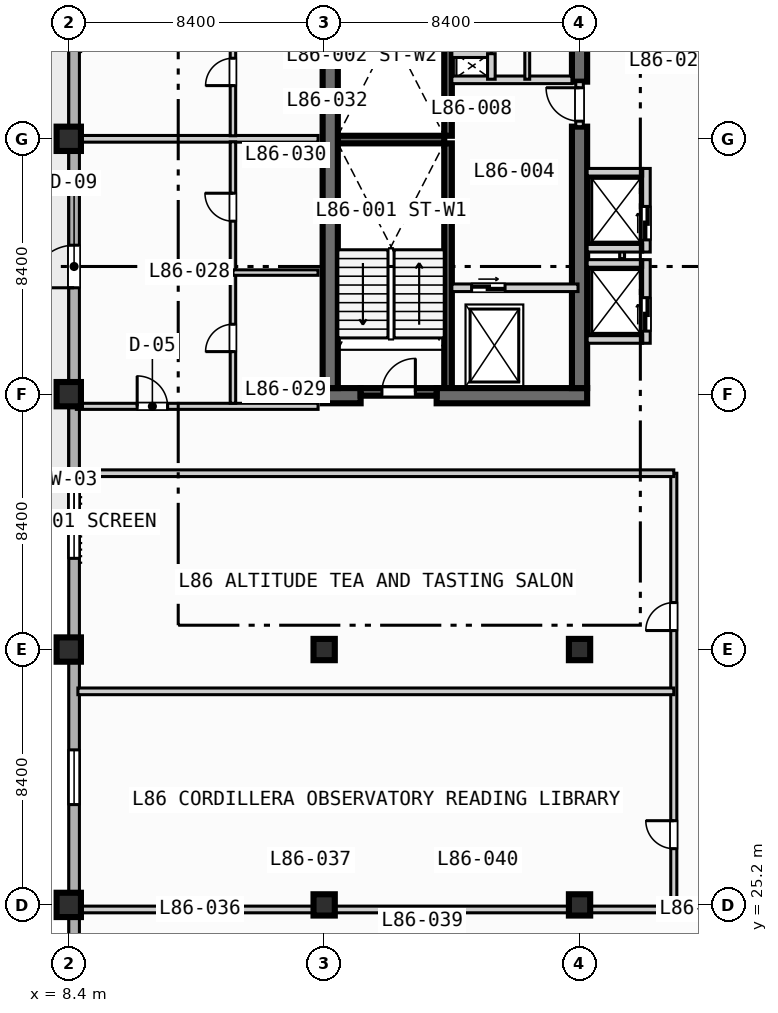
"""IFC4 building model, lengths in metres.
Left out: names, types, materials, properties, quantities, classifications, styles, units other than length and angle.
Written with IfcOpenShell. Run it as: python <this file> out.ifc"""

import sys

from ifc_helpers import new_model, si_unit, direction, frame, frame_2d, origin, origin_2d, place, context, subcontext, project, spatial, rectangle, extrude, element, fill, save


model = new_model("IFC4")
c1 = context("Model", 3, precision=1e-05, world=origin(), true_north=direction((0.0, 1.0)))
c2 = subcontext(c1, "Body", "Model", "MODEL_VIEW")
j1 = project(units=[si_unit("LENGTHUNIT", "METRE"), si_unit("PLANEANGLEUNIT", "RADIAN")], contexts=[c1])
p1 = place(None, origin())
s1 = spatial("IfcSite", under=j1, at=p1, CompositionType="ELEMENT")
p2 = place(p1, origin())
s2 = spatial("IfcBuilding", under=s1, at=p2, CompositionType="ELEMENT")
p3 = place(p2, frame((0.0, 0.0, 347.6)))
s3 = spatial("IfcBuildingStorey", under=s2, at=p3, CompositionType="ELEMENT", Elevation=347.6)
for number, where, z_axis, x_axis in (
    (1, (20.875, 42.2, 0.0), (0.0, 0.0, 1.0), (0.0, 1.0, 0.0)),
    (2, (20.875, 50.5, 0.0), (0.0, 0.0, 1.0), (0.0, 1.0, 0.0)),
):
    element("IfcWall", number, at=place(p3, frame(where, z_axis=z_axis, x_axis=x_axis)), inside=s3, PredefinedType="SOLIDWALL", context=c2, shape_type="SweptSolid", body=[
        extrude(rectangle(XDim=8.05, YDim=0.25, at=frame_2d((4.025, 0.0))), origin(), (0.0, 0.0, 1.0), 3.67),
    ])
p4 = place(p3, frame((17.25, 50.375, 0.0), z_axis=(0.0, 0.0, 1.0), x_axis=(1.0, 0.0, 0.0)))
e3 = element("IfcWall", 3, at=p4, inside=s3, PredefinedType="SOLIDWALL", context=c2, shape_type="SweptSolid", body=[
    extrude(rectangle(XDim=3.5, YDim=0.25, at=frame_2d((1.75, 0.0))), origin(), (0.0, 0.0, 1.0), 3.67),
])
p5 = place(p3, frame((16.75, 41.95, 0.0), z_axis=(0.0, 0.0, 1.0), x_axis=(1.0, 0.0, 0.0)))
e4 = element("IfcWall", 4, at=p5, inside=s3, PredefinedType="SHEAR", context=c2, shape_type="SweptSolid", body=[
    extrude(rectangle(XDim=1.25, YDim=0.5, at=frame_2d((0.625, 0.0))), origin(), (0.0, 0.0, 1.0), 3.67),
])
p6 = place(p3, frame((20.5, 41.95, 0.0), z_axis=(0.0, 0.0, 1.0), x_axis=(1.0, 0.0, 0.0)))
e5 = element("IfcWall", 5, at=p6, inside=s3, PredefinedType="SHEAR", context=c2, shape_type="SweptSolid", body=[
    extrude(rectangle(XDim=4.95, YDim=0.5, at=frame_2d((2.475, 0.0))), origin(), (0.0, 0.0, 1.0), 3.67),
])
p7 = place(p3, frame((17.0, 42.2, 0.0), z_axis=(0.0, 0.0, 1.0), x_axis=(0.0, 1.0, 0.0)))
e6 = element("IfcWall", 6, at=p7, inside=s3, PredefinedType="SHEAR", context=c2, shape_type="SweptSolid", body=[
    extrude(rectangle(XDim=16.35, YDim=0.5, at=frame_2d((8.175, 0.0))), origin(), (0.0, 0.0, 1.0), 3.67),
])
p8 = place(p3, frame((25.2, 42.2, 0.0), z_axis=(0.0, 0.0, 1.0), x_axis=(0.0, 1.0, 0.0)))
e7 = element("IfcWall", 7, at=p8, inside=s3, PredefinedType="SHEAR", context=c2, shape_type="SweptSolid", body=[
    extrude(rectangle(XDim=8.6, YDim=0.5, at=frame_2d((4.3, 0.0))), origin(), (0.0, 0.0, 1.0), 3.67),
])
p9 = place(p3, frame((25.2, 52.28, 0.0), z_axis=(0.0, 0.0, 1.0), x_axis=(0.0, 1.0, 0.0)))
e8 = element("IfcWall", 8, at=p9, inside=s3, PredefinedType="SHEAR", context=c2, shape_type="SweptSolid", body=[
    extrude(rectangle(XDim=1.27, YDim=0.5, at=frame_2d((0.635, 0.0))), origin(), (0.0, 0.0, 1.0), 3.67),
])
for number, where, z_axis, x_axis in (
    (9, (8.4, 25.2, 0.0), (0.0, 0.0, 1.0), (1.0, 0.0, 0.0)),
    (10, (8.4, 33.6, 0.0), (0.0, 0.0, 1.0), (1.0, 0.0, 0.0)),
    (11, (8.4, 42.0, 0.0), (0.0, 0.0, 1.0), (1.0, 0.0, 0.0)),
    (12, (8.4, 50.4, 0.0), (0.0, 0.0, 1.0), (1.0, 0.0, 0.0)),
):
    element("IfcColumn", number, at=place(p3, frame(where, z_axis=z_axis, x_axis=x_axis)), inside=s3, PredefinedType="COLUMN", context=c2, shape_type="SweptSolid", body=[
        extrude(rectangle(XDim=0.8, YDim=0.8, at=origin_2d()), origin(), (0.0, 0.0, 1.0), 3.9),
    ])
for number, where, z_axis, x_axis in (
    (13, (16.8, 25.2, 0.0), (0.0, 0.0, 1.0), (1.0, 0.0, 0.0)),
    (14, (16.8, 33.6, 0.0), (0.0, 0.0, 1.0), (1.0, 0.0, 0.0)),
    (15, (25.2, 25.2, 0.0), (0.0, 0.0, 1.0), (1.0, 0.0, 0.0)),
    (16, (25.2, 33.6, 0.0), (0.0, 0.0, 1.0), (1.0, 0.0, 0.0)),
):
    element("IfcColumn", number, at=place(p3, frame(where, z_axis=z_axis, x_axis=x_axis)), inside=s3, PredefinedType="COLUMN", context=c2, shape_type="SweptSolid", body=[
        extrude(rectangle(XDim=0.7, YDim=0.7, at=origin_2d()), origin(), (0.0, 0.0, 1.0), 3.9),
    ])
p10 = place(p3, frame((8.575, 11.575, 0.0), z_axis=(0.0, 0.0, 1.0), x_axis=(0.0, 1.0, 0.0)))
e17 = element("IfcWall", 17, at=p10, inside=s3, PredefinedType="STANDARD", context=c2, shape_type="SweptSolid", body=[
    extrude(rectangle(XDim=60.85, YDim=0.35, at=frame_2d((30.425, 0.0))), origin(), (0.0, 0.0, 1.0), 3.67),
])
p11 = place(p10, frame((33.925, 0.0, 0.0)))
e18 = element("IfcOpeningElement", 18, at=p11, cuts=e17, PredefinedType="OPENING", context=c2, shape_type="SweptSolid", body=[
    extrude(rectangle(XDim=1.4, YDim=2.2, at=frame_2d((0.7, 1.1))), frame((0.0, 0.185, 0.0), z_axis=(0.0, -1.0, 0.0), x_axis=(1.0, 0.0, 0.0)), (0.0, 0.0, 1.0), 0.37),
])
p12 = place(p10, frame((16.925, 0.0, 0.85)))
e19 = element("IfcOpeningElement", 19, at=p12, cuts=e17, PredefinedType="OPENING", context=c2, shape_type="SweptSolid", body=[
    extrude(rectangle(XDim=1.8, YDim=1.8, at=frame_2d((0.9, 0.9))), frame((0.0, 0.185, 0.0), z_axis=(0.0, -1.0, 0.0), x_axis=(1.0, 0.0, 0.0)), (0.0, 0.0, 1.0), 0.37),
])
p13 = place(p10, frame((25.025, 0.0, 0.85)))
e20 = element("IfcOpeningElement", 20, at=p13, cuts=e17, PredefinedType="OPENING", context=c2, shape_type="SweptSolid", body=[
    extrude(rectangle(XDim=2.4, YDim=1.95, at=frame_2d((1.2, 0.975))), frame((0.0, 0.185, 0.0), z_axis=(0.0, -1.0, 0.0), x_axis=(1.0, 0.0, 0.0)), (0.0, 0.0, 1.0), 0.37),
])
p14 = place(p10, frame((41.825, 0.0, 0.85)))
e21 = element("IfcOpeningElement", 21, at=p14, cuts=e17, PredefinedType="OPENING", context=c2, shape_type="SweptSolid", body=[
    extrude(rectangle(XDim=2.4, YDim=1.95, at=frame_2d((1.2, 0.975))), frame((0.0, 0.185, 0.0), z_axis=(0.0, -1.0, 0.0), x_axis=(1.0, 0.0, 0.0)), (0.0, 0.0, 1.0), 0.37),
])
p15 = place(p3, frame((18.0, 42.075, 0.0), z_axis=(0.0, 0.0, 1.0), x_axis=(1.0, 0.0, 0.0)))
e22 = element("IfcWall", 22, at=p15, inside=s3, PredefinedType="SOLIDWALL", context=c2, shape_type="SweptSolid", body=[
    extrude(rectangle(XDim=2.5, YDim=0.25, at=frame_2d((1.25, 0.0))), origin(), (0.0, 0.0, 1.0), 3.67),
])
p16 = place(p15, frame((0.7, 0.0, 0.0)))
e23 = element("IfcOpeningElement", 23, at=p16, cuts=e22, PredefinedType="OPENING", context=c2, shape_type="SweptSolid", body=[
    extrude(rectangle(XDim=1.1, YDim=2.15, at=frame_2d((0.55, 1.075))), frame((0.0, 0.135, 0.0), z_axis=(0.0, -1.0, 0.0), x_axis=(1.0, 0.0, 0.0)), (0.0, 0.0, 1.0), 0.27),
])
p17 = place(p3, frame((21.0, 45.5, 0.0), z_axis=(0.0, 0.0, 1.0), x_axis=(1.0, 0.0, 0.0)))
e24 = element("IfcWall", 24, at=p17, inside=s3, PredefinedType="SOLIDWALL", context=c2, shape_type="SweptSolid", body=[
    extrude(rectangle(XDim=4.15, YDim=0.25, at=frame_2d((2.075, 0.0))), origin(), (0.0, 0.0, 1.0), 3.67),
])
p18 = place(p17, frame((0.65, 0.0, 0.0)))
e25 = element("IfcOpeningElement", 25, at=p18, cuts=e24, PredefinedType="OPENING", context=c2, shape_type="SweptSolid", body=[
    extrude(rectangle(XDim=1.1, YDim=2.15, at=frame_2d((0.55, 1.075))), frame((0.0, 0.135, 0.0), z_axis=(0.0, -1.0, 0.0), x_axis=(1.0, 0.0, 0.0)), (0.0, 0.0, 1.0), 0.27),
])
p19 = place(p3, frame((25.2, 50.8, 0.0), z_axis=(0.0, 0.0, 1.0), x_axis=(0.0, 1.0, 0.0)))
e26 = element("IfcWall", 26, at=p19, inside=s3, PredefinedType="SOLIDWALL", context=c2, shape_type="SweptSolid", body=[
    extrude(rectangle(XDim=1.48, YDim=0.25, at=frame_2d((0.74, 0.0))), origin(), (0.0, 0.0, 1.0), 3.67),
])
p20 = place(p19, frame((0.18, 0.0, 0.0)))
e27 = element("IfcOpeningElement", 27, at=p20, cuts=e26, PredefinedType="OPENING", context=c2, shape_type="SweptSolid", body=[
    extrude(rectangle(XDim=1.1, YDim=2.15, at=frame_2d((0.55, 1.075))), frame((0.0, 0.135, 0.0), z_axis=(0.0, -1.0, 0.0), x_axis=(1.0, 0.0, 0.0)), (0.0, 0.0, 1.0), 0.27),
])
p21 = place(p3, frame((21.0, 52.34, 0.0), z_axis=(0.0, 0.0, 1.0), x_axis=(1.0, 0.0, 0.0)))
e28 = element("IfcWall", 28, at=p21, inside=s3, PredefinedType="SOLIDWALL", context=c2, shape_type="SweptSolid", body=[
    extrude(rectangle(XDim=3.95, YDim=0.25, at=frame_2d((1.975, 0.0))), origin(), (0.0, 0.0, 1.0), 3.67),
])
p22 = place(p3, frame((21.0, 53.2, 0.0), z_axis=(0.0, 0.0, 1.0), x_axis=(1.0, 0.0, 0.0)))
e29 = element("IfcWall", 29, at=p22, inside=s3, PredefinedType="SOLIDWALL", context=c2, shape_type="SweptSolid", body=[
    extrude(rectangle(XDim=1.3, YDim=0.25, at=frame_2d((0.65, 0.0))), origin(), (0.0, 0.0, 1.0), 3.67),
])
p23 = place(p3, frame((22.3, 52.36, 0.0), z_axis=(0.0, 0.0, 1.0), x_axis=(0.0, 1.0, 0.0)))
e30 = element("IfcWall", 30, at=p23, inside=s3, PredefinedType="SOLIDWALL", context=c2, shape_type="SweptSolid", body=[
    extrude(rectangle(XDim=0.84, YDim=0.25, at=frame_2d((0.42, 0.0))), origin(), (0.0, 0.0, 1.0), 3.67),
])
p24 = place(p3, frame((23.48, 52.36, 0.0), z_axis=(0.0, 0.0, 1.0), x_axis=(0.0, 1.0, 0.0)))
e31 = element("IfcWall", 31, at=p24, inside=s3, PredefinedType="PARTITIONING", context=c2, shape_type="SweptSolid", body=[
    extrude(rectangle(XDim=1.1, YDim=0.16, at=frame_2d((0.55, 0.0))), origin(), (0.0, 0.0, 1.0), 3.67),
])
p25 = place(p3, frame((27.4, 43.675, 0.0), z_axis=(0.0, 0.0, 1.0), x_axis=(0.0, 1.0, 0.0)))
e32 = element("IfcWall", 32, at=p25, inside=s3, PredefinedType="SOLIDWALL", context=c2, shape_type="SweptSolid", body=[
    extrude(rectangle(XDim=2.75, YDim=0.25, at=frame_2d((1.375, 0.0))), origin(), (0.0, 0.0, 1.0), 3.67),
])
p26 = place(p25, frame((0.4, 0.0, 0.0)))
e33 = element("IfcOpeningElement", 33, at=p26, cuts=e32, PredefinedType="OPENING", context=c2, shape_type="SweptSolid", body=[
    extrude(rectangle(XDim=1.1, YDim=2.15, at=frame_2d((0.55, 1.075))), frame((0.0, 0.135, 0.0), z_axis=(0.0, -1.0, 0.0), x_axis=(1.0, 0.0, 0.0)), (0.0, 0.0, 1.0), 0.27),
])
for number, where, z_axis, x_axis in (
    (34, (25.45, 43.8, 0.0), (0.0, 0.0, 1.0), (1.0, 0.0, 0.0)),
    (35, (25.45, 46.3, 0.0), (0.0, 0.0, 1.0), (1.0, 0.0, 0.0)),
):
    element("IfcWall", number, at=place(p3, frame(where, z_axis=z_axis, x_axis=x_axis)), inside=s3, PredefinedType="SOLIDWALL", context=c2, shape_type="SweptSolid", body=[
        extrude(rectangle(XDim=1.825, YDim=0.25, at=frame_2d((0.913, 0.0))), origin(), (0.0, 0.0, 1.0), 3.67),
    ])
p27 = place(p3, frame((26.6, 46.46, 0.0), z_axis=(0.0, 0.0, 1.0), x_axis=(0.0, 1.0, 0.0)))
e36 = element("IfcWall", 36, at=p27, inside=s3, PredefinedType="PARTITIONING", context=c2, shape_type="SweptSolid", body=[
    extrude(rectangle(XDim=0.88, YDim=0.16, at=frame_2d((0.44, 0.0))), origin(), (0.0, 0.0, 1.0), 3.67),
])
p28 = place(p3, frame((27.4, 46.675, 0.0), z_axis=(0.0, 0.0, 1.0), x_axis=(0.0, 1.0, 0.0)))
e37 = element("IfcWall", 37, at=p28, inside=s3, PredefinedType="SOLIDWALL", context=c2, shape_type="SweptSolid", body=[
    extrude(rectangle(XDim=2.75, YDim=0.25, at=frame_2d((1.375, 0.0))), origin(), (0.0, 0.0, 1.0), 3.67),
])
p29 = place(p28, frame((0.4, 0.0, 0.0)))
e38 = element("IfcOpeningElement", 38, at=p29, cuts=e37, PredefinedType="OPENING", context=c2, shape_type="SweptSolid", body=[
    extrude(rectangle(XDim=1.1, YDim=2.15, at=frame_2d((0.55, 1.075))), frame((0.0, 0.135, 0.0), z_axis=(0.0, -1.0, 0.0), x_axis=(1.0, 0.0, 0.0)), (0.0, 0.0, 1.0), 0.27),
])
for number, where, z_axis, x_axis in (
    (39, (25.45, 46.8, 0.0), (0.0, 0.0, 1.0), (1.0, 0.0, 0.0)),
    (40, (25.45, 49.3, 0.0), (0.0, 0.0, 1.0), (1.0, 0.0, 0.0)),
):
    element("IfcWall", number, at=place(p3, frame(where, z_axis=z_axis, x_axis=x_axis)), inside=s3, PredefinedType="SOLIDWALL", context=c2, shape_type="SweptSolid", body=[
        extrude(rectangle(XDim=1.825, YDim=0.25, at=frame_2d((0.913, 0.0))), origin(), (0.0, 0.0, 1.0), 3.67),
    ])
p30 = place(p3, frame((8.65, 41.6, 0.0), z_axis=(0.0, 0.0, 1.0), x_axis=(1.0, 0.0, 0.0)))
e41 = element("IfcWall", 41, at=p30, inside=s3, PredefinedType="PARTITIONING", context=c2, shape_type="SweptSolid", body=[
    extrude(rectangle(XDim=7.95, YDim=0.2, at=frame_2d((3.975, 0.0))), origin(), (0.0, 0.0, 1.0), 3.67),
])
p31 = place(p30, frame((2.0, 0.0, 0.0)))
e42 = element("IfcOpeningElement", 42, at=p31, cuts=e41, PredefinedType="OPENING", context=c2, shape_type="SweptSolid", body=[
    extrude(rectangle(XDim=1.0, YDim=2.15, at=frame_2d((0.5, 1.075))), frame((0.0, 0.11, 0.0), z_axis=(0.0, -1.0, 0.0), x_axis=(1.0, 0.0, 0.0)), (0.0, 0.0, 1.0), 0.22),
])
p32 = place(p3, frame((8.65, 50.4, 0.0), z_axis=(0.0, 0.0, 1.0), x_axis=(1.0, 0.0, 0.0)))
e43 = element("IfcWall", 43, at=p32, inside=s3, PredefinedType="PARTITIONING", context=c2, shape_type="SweptSolid", body=[
    extrude(rectangle(XDim=7.95, YDim=0.22, at=frame_2d((3.975, 0.0))), origin(), (0.0, 0.0, 1.0), 3.059),
])
p33 = place(p3, frame((13.8, 41.7, 0.0), z_axis=(0.0, 0.0, 1.0), x_axis=(0.0, 1.0, 0.0)))
e44 = element("IfcWall", 44, at=p33, inside=s3, PredefinedType="PLUMBINGWALL", context=c2, shape_type="SweptSolid", body=[
    extrude(rectangle(XDim=8.6, YDim=0.18, at=frame_2d((4.3, 0.0))), origin(), (0.0, 0.0, 1.0), 3.67),
])
p34 = place(p33, frame((1.7, 0.0, 0.0)))
e45 = element("IfcOpeningElement", 45, at=p34, cuts=e44, PredefinedType="OPENING", context=c2, shape_type="SweptSolid", body=[
    extrude(rectangle(XDim=0.9, YDim=2.1, at=frame_2d((0.45, 1.05))), frame((0.0, 0.1, 0.0), z_axis=(0.0, -1.0, 0.0), x_axis=(1.0, 0.0, 0.0)), (0.0, 0.0, 1.0), 0.2),
])
p35 = place(p33, frame((5.99, 0.0, 0.0)))
e46 = element("IfcOpeningElement", 46, at=p35, cuts=e44, PredefinedType="OPENING", context=c2, shape_type="SweptSolid", body=[
    extrude(rectangle(XDim=0.92, YDim=2.1, at=frame_2d((0.46, 1.05))), frame((0.0, 0.1, 0.0), z_axis=(0.0, -1.0, 0.0), x_axis=(1.0, 0.0, 0.0)), (0.0, 0.0, 1.0), 0.2),
])
p36 = place(p3, frame((13.8, 46.0, 0.0), z_axis=(0.0, 0.0, 1.0), x_axis=(1.0, 0.0, 0.0)))
e47 = element("IfcWall", 47, at=p36, inside=s3, PredefinedType="PLUMBINGWALL", context=c2, shape_type="SweptSolid", body=[
    extrude(rectangle(XDim=2.8, YDim=0.18, at=frame_2d((1.4, 0.0))), origin(), (0.0, 0.0, 1.0), 3.67),
])
p37 = place(p3, frame((13.8, 50.5, 0.0), z_axis=(0.0, 0.0, 1.0), x_axis=(0.0, 1.0, 0.0)))
e48 = element("IfcWall", 48, at=p37, inside=s3, PredefinedType="PLUMBINGWALL", context=c2, shape_type="SweptSolid", body=[
    extrude(rectangle(XDim=8.4, YDim=0.18, at=frame_2d((4.2, 0.0))), origin(), (0.0, 0.0, 1.0), 3.67),
])
p38 = place(p37, frame((1.65, 0.0, 0.0)))
e49 = element("IfcOpeningElement", 49, at=p38, cuts=e48, PredefinedType="OPENING", context=c2, shape_type="SweptSolid", body=[
    extrude(rectangle(XDim=0.9, YDim=2.1, at=frame_2d((0.45, 1.05))), frame((0.0, 0.1, 0.0), z_axis=(0.0, -1.0, 0.0), x_axis=(1.0, 0.0, 0.0)), (0.0, 0.0, 1.0), 0.2),
])
p39 = place(p37, frame((5.84, 0.0, 0.0)))
e50 = element("IfcOpeningElement", 50, at=p39, cuts=e48, PredefinedType="OPENING", context=c2, shape_type="SweptSolid", body=[
    extrude(rectangle(XDim=0.92, YDim=2.1, at=frame_2d((0.46, 1.05))), frame((0.0, 0.1, 0.0), z_axis=(0.0, -1.0, 0.0), x_axis=(1.0, 0.0, 0.0)), (0.0, 0.0, 1.0), 0.2),
])
p40 = place(p3, frame((28.3, 25.05, 0.0), z_axis=(0.0, 0.0, 1.0), x_axis=(0.0, 1.0, 0.0)))
e51 = element("IfcWall", 51, at=p40, inside=s3, PredefinedType="PARTITIONING", context=c2, shape_type="SweptSolid", body=[
    extrude(rectangle(XDim=14.35, YDim=0.2, at=frame_2d((7.175, 0.0))), origin(), (0.0, 0.0, 1.0), 3.67),
])
p41 = place(p40, frame((2.0, 0.0, 0.0)))
e52 = element("IfcOpeningElement", 52, at=p41, cuts=e51, PredefinedType="OPENING", context=c2, shape_type="SweptSolid", body=[
    extrude(rectangle(XDim=0.92, YDim=2.1, at=frame_2d((0.46, 1.05))), frame((0.0, 0.11, 0.0), z_axis=(0.0, -1.0, 0.0), x_axis=(1.0, 0.0, 0.0)), (0.0, 0.0, 1.0), 0.22),
])
p42 = place(p40, frame((9.175, 0.0, 0.0)))
e53 = element("IfcOpeningElement", 53, at=p42, cuts=e51, PredefinedType="OPENING", context=c2, shape_type="SweptSolid", body=[
    extrude(rectangle(XDim=0.92, YDim=2.1, at=frame_2d((0.46, 1.05))), frame((0.0, 0.11, 0.0), z_axis=(0.0, -1.0, 0.0), x_axis=(1.0, 0.0, 0.0)), (0.0, 0.0, 1.0), 0.22),
])
p43 = place(p3, frame((8.7, 25.05, 0.0), z_axis=(0.0, 0.0, 1.0), x_axis=(1.0, 0.0, 0.0)))
e54 = element("IfcWall", 54, at=p43, inside=s3, PredefinedType="PARTITIONING", context=c2, shape_type="SweptSolid", body=[
    extrude(rectangle(XDim=19.6, YDim=0.22, at=frame_2d((9.8, 0.0))), origin(), (0.0, 0.0, 1.0), 3.059),
])
for number, where, z_axis, x_axis in (
    (55, (8.7, 32.225, 0.0), (0.0, 0.0, 1.0), (1.0, 0.0, 0.0)),
    (56, (8.7, 39.4, 0.0), (0.0, 0.0, 1.0), (1.0, 0.0, 0.0)),
):
    element("IfcWall", number, at=place(p3, frame(where, z_axis=z_axis, x_axis=x_axis)), inside=s3, PredefinedType="PARTITIONING", context=c2, shape_type="SweptSolid", body=[
        extrude(rectangle(XDim=19.6, YDim=0.22, at=frame_2d((9.8, 0.0))), origin(), (0.0, 0.0, 1.0), 3.67),
    ])
p44 = place(p11, origin())
e57 = element("IfcDoor", 57, at=p44, inside=s3, OperationType="SINGLE_SWING_LEFT", PredefinedType="DOOR", context=c2, shape_type="SweptSolid", body=[
    extrude(rectangle(XDim=1.4, YDim=2.2, at=frame_2d((0.7, 1.1))), frame((0.0, 0.025, 0.0), z_axis=(0.0, -1.0, 0.0), x_axis=(1.0, 0.0, 0.0)), (0.0, 0.0, 1.0), 0.05),
])
fill(e18, e57)
p45 = place(p12, origin())
e58 = element("IfcWindow", 58, at=p45, inside=s3, PartitioningType="SINGLE_PANEL", PredefinedType="WINDOW", context=c2, shape_type="SweptSolid", body=[
    extrude(rectangle(XDim=1.8, YDim=1.8, at=frame_2d((0.9, 0.9))), frame((0.0, 0.03, 0.0), z_axis=(0.0, -1.0, 0.0), x_axis=(1.0, 0.0, 0.0)), (0.0, 0.0, 1.0), 0.06),
])
fill(e19, e58)
p46 = place(p13, origin())
e59 = element("IfcWindow", 59, at=p46, inside=s3, PartitioningType="SINGLE_PANEL", PredefinedType="WINDOW", context=c2, shape_type="SweptSolid", body=[
    extrude(rectangle(XDim=2.4, YDim=1.95, at=frame_2d((1.2, 0.975))), frame((0.0, 0.03, 0.0), z_axis=(0.0, -1.0, 0.0), x_axis=(1.0, 0.0, 0.0)), (0.0, 0.0, 1.0), 0.06),
])
fill(e20, e59)
p47 = place(p16, origin())
e60 = element("IfcDoor", 60, at=p47, inside=s3, OperationType="SINGLE_SWING_RIGHT", PredefinedType="DOOR", context=c2, shape_type="SweptSolid", body=[
    extrude(rectangle(XDim=1.1, YDim=2.15, at=frame_2d((0.55, 1.075))), frame((0.0, 0.025, 0.0), z_axis=(0.0, -1.0, 0.0), x_axis=(1.0, 0.0, 0.0)), (0.0, 0.0, 1.0), 0.05),
])
fill(e23, e60)
p48 = place(p18, origin())
e61 = element("IfcDoor", 61, at=p48, inside=s3, OperationType="SLIDING_TO_LEFT", PredefinedType="DOOR", context=c2, shape_type="SweptSolid", body=[
    extrude(rectangle(XDim=1.1, YDim=2.15, at=frame_2d((0.55, 1.075))), frame((0.0, 0.025, 0.0), z_axis=(0.0, -1.0, 0.0), x_axis=(1.0, 0.0, 0.0)), (0.0, 0.0, 1.0), 0.05),
])
fill(e25, e61)
p49 = place(p20, origin())
e62 = element("IfcDoor", 62, at=p49, inside=s3, OperationType="SINGLE_SWING_RIGHT", PredefinedType="DOOR", context=c2, shape_type="SweptSolid", body=[
    extrude(rectangle(XDim=1.1, YDim=2.15, at=frame_2d((0.55, 1.075))), frame((0.0, 0.025, 0.0), z_axis=(0.0, -1.0, 0.0), x_axis=(1.0, 0.0, 0.0)), (0.0, 0.0, 1.0), 0.05),
])
fill(e27, e62)
p50 = place(p26, origin())
e63 = element("IfcDoor", 63, at=p50, inside=s3, OperationType="SLIDING_TO_LEFT", PredefinedType="DOOR", context=c2, shape_type="SweptSolid", body=[
    extrude(rectangle(XDim=1.1, YDim=2.15, at=frame_2d((0.55, 1.075))), frame((0.0, 0.025, 0.0), z_axis=(0.0, -1.0, 0.0), x_axis=(1.0, 0.0, 0.0)), (0.0, 0.0, 1.0), 0.05),
])
fill(e33, e63)
p51 = place(p29, origin())
e64 = element("IfcDoor", 64, at=p51, inside=s3, OperationType="SLIDING_TO_LEFT", PredefinedType="DOOR", context=c2, shape_type="SweptSolid", body=[
    extrude(rectangle(XDim=1.1, YDim=2.15, at=frame_2d((0.55, 1.075))), frame((0.0, 0.025, 0.0), z_axis=(0.0, -1.0, 0.0), x_axis=(1.0, 0.0, 0.0)), (0.0, 0.0, 1.0), 0.05),
])
fill(e38, e64)
p52 = place(p31, origin())
e65 = element("IfcDoor", 65, at=p52, inside=s3, OperationType="SINGLE_SWING_LEFT", PredefinedType="DOOR", context=c2, shape_type="SweptSolid", body=[
    extrude(rectangle(XDim=1.0, YDim=2.15, at=frame_2d((0.5, 1.075))), frame((0.0, 0.025, 0.0), z_axis=(0.0, -1.0, 0.0), x_axis=(1.0, 0.0, 0.0)), (0.0, 0.0, 1.0), 0.05),
])
fill(e42, e65)
p53 = place(p34, origin())
e66 = element("IfcDoor", 66, at=p53, inside=s3, OperationType="SINGLE_SWING_LEFT", PredefinedType="DOOR", context=c2, shape_type="SweptSolid", body=[
    extrude(rectangle(XDim=0.9, YDim=2.1, at=frame_2d((0.45, 1.05))), frame((0.0, 0.025, 0.0), z_axis=(0.0, -1.0, 0.0), x_axis=(1.0, 0.0, 0.0)), (0.0, 0.0, 1.0), 0.05),
])
fill(e45, e66)
p54 = place(p35, origin())
e67 = element("IfcDoor", 67, at=p54, inside=s3, OperationType="SINGLE_SWING_RIGHT", PredefinedType="DOOR", context=c2, shape_type="SweptSolid", body=[
    extrude(rectangle(XDim=0.92, YDim=2.1, at=frame_2d((0.46, 1.05))), frame((0.0, 0.025, 0.0), z_axis=(0.0, -1.0, 0.0), x_axis=(1.0, 0.0, 0.0)), (0.0, 0.0, 1.0), 0.05),
])
fill(e46, e67)
p55 = place(p38, origin())
e68 = element("IfcDoor", 68, at=p55, inside=s3, OperationType="SINGLE_SWING_LEFT", PredefinedType="DOOR", context=c2, shape_type="SweptSolid", body=[
    extrude(rectangle(XDim=0.9, YDim=2.1, at=frame_2d((0.45, 1.05))), frame((0.0, 0.025, 0.0), z_axis=(0.0, -1.0, 0.0), x_axis=(1.0, 0.0, 0.0)), (0.0, 0.0, 1.0), 0.05),
])
fill(e49, e68)
p56 = place(p41, origin())
e69 = element("IfcDoor", 69, at=p56, inside=s3, OperationType="SINGLE_SWING_RIGHT", PredefinedType="DOOR", context=c2, shape_type="SweptSolid", body=[
    extrude(rectangle(XDim=0.92, YDim=2.1, at=frame_2d((0.46, 1.05))), frame((0.0, 0.025, 0.0), z_axis=(0.0, -1.0, 0.0), x_axis=(1.0, 0.0, 0.0)), (0.0, 0.0, 1.0), 0.05),
])
fill(e52, e69)
p57 = place(p42, origin())
e70 = element("IfcDoor", 70, at=p57, inside=s3, OperationType="SINGLE_SWING_LEFT", PredefinedType="DOOR", context=c2, shape_type="SweptSolid", body=[
    extrude(rectangle(XDim=0.92, YDim=2.1, at=frame_2d((0.46, 1.05))), frame((0.0, 0.025, 0.0), z_axis=(0.0, -1.0, 0.0), x_axis=(1.0, 0.0, 0.0)), (0.0, 0.0, 1.0), 0.05),
])
fill(e53, e70)
save(model, sys.argv[1])
